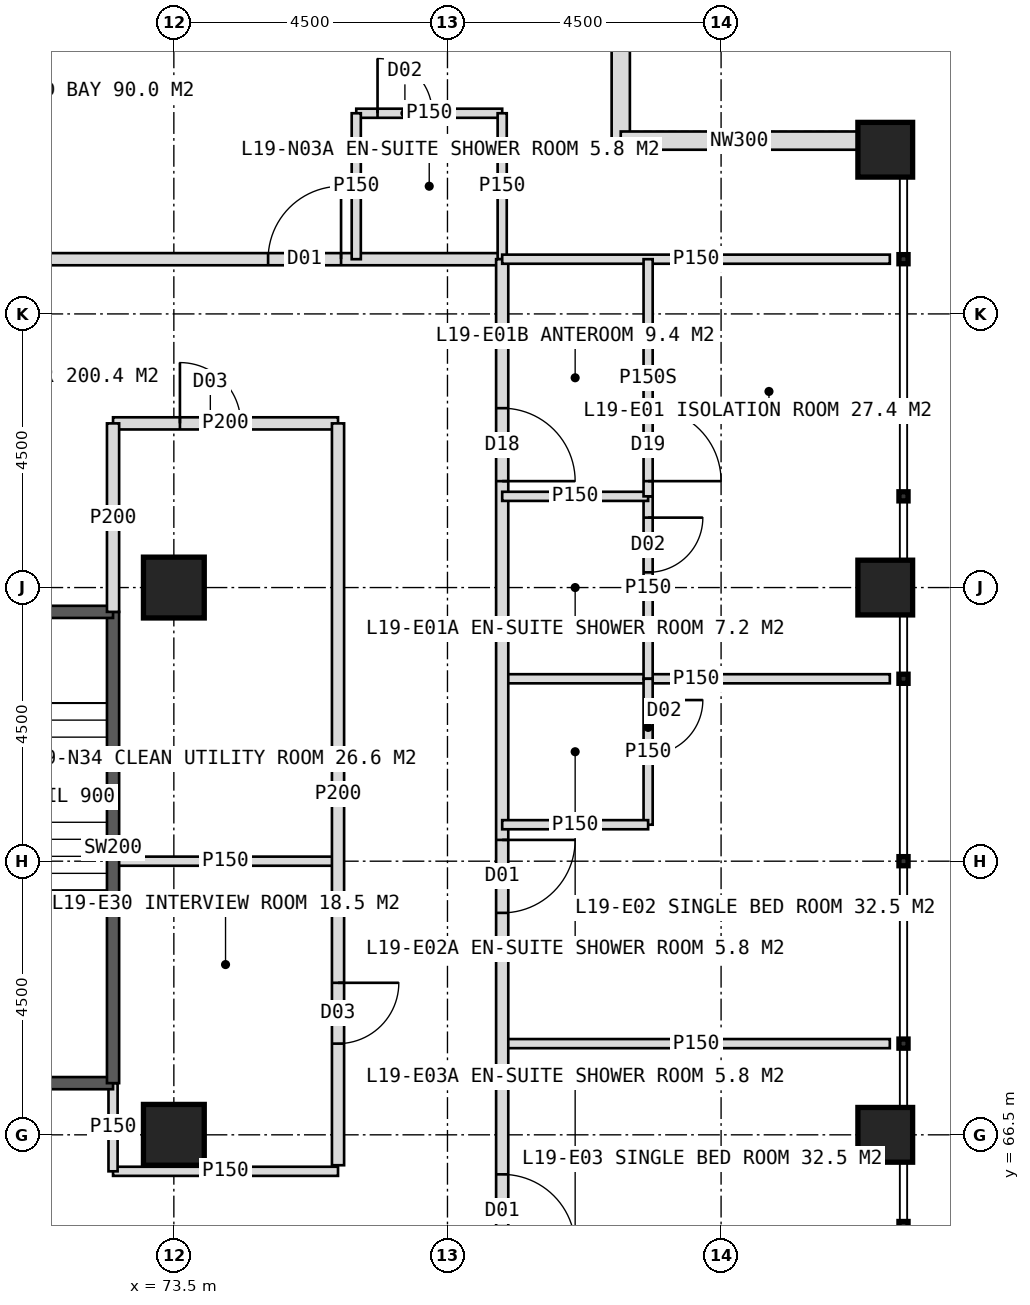
"""IFC4 building model, lengths in metres.
Left out: names, types, materials, properties, quantities, classifications, styles, units other than length and angle.
Written with IfcOpenShell. Run it as: python <this file> out.ifc"""

import sys

from ifc_helpers import new_model, si_unit, direction, frame, frame_2d, origin, origin_2d, place, context, subcontext, project, spatial, rectangle, hollow_rectangle, extrude, element, fill, save


model = new_model("IFC4")
c1 = context("Model", 3, precision=1e-05, world=origin(), true_north=direction((0.0, 1.0)))
c2 = subcontext(c1, "Body", "Model", "MODEL_VIEW")
j1 = project(units=[si_unit("LENGTHUNIT", "METRE"), si_unit("PLANEANGLEUNIT", "RADIAN")], contexts=[c1])
p1 = place(None, origin())
s1 = spatial("IfcSite", under=j1, at=p1, CompositionType="ELEMENT")
p2 = place(p1, origin())
s2 = spatial("IfcBuilding", under=s1, at=p2, CompositionType="ELEMENT")
p3 = place(p2, frame((0.0, 0.0, 83.0)))
s3 = spatial("IfcBuildingStorey", under=s2, at=p3, CompositionType="ELEMENT", Elevation=83.0)
for number, where, z_axis, x_axis in (
    (1, (73.5, 75.5, 0.0), (0.0, 0.0, 1.0), (1.0, 0.0, 0.0)),
    (2, (73.5, 66.5, 0.0), (0.0, 0.0, 1.0), (1.0, 0.0, 0.0)),
):
    element("IfcColumn", number, at=place(p3, frame(where, z_axis=z_axis, x_axis=x_axis)), inside=s3, PredefinedType="COLUMN", context=c2, shape_type="SweptSolid", body=[
        extrude(hollow_rectangle(XDim=1.0, YDim=1.0, WallThickness=0.1, at=origin_2d()), origin(), (0.0, 0.0, 1.0), 4.0),
    ])
for number, where, z_axis, x_axis in (
    (3, (85.2, 66.5, 0.0), (0.0, 0.0, 1.0), (1.0, 0.0, 0.0)),
    (4, (85.2, 75.5, 0.0), (0.0, 0.0, 1.0), (1.0, 0.0, 0.0)),
    (5, (85.2, 82.7, 0.0), (0.0, 0.0, 1.0), (1.0, 0.0, 0.0)),
):
    element("IfcColumn", number, at=place(p3, frame(where, z_axis=z_axis, x_axis=x_axis)), inside=s3, PredefinedType="COLUMN", context=c2, shape_type="SweptSolid", body=[
        extrude(hollow_rectangle(XDim=0.9, YDim=0.9, WallThickness=0.08, at=origin_2d()), origin(), (0.0, 0.0, 1.0), 4.0),
    ])
for number, where, z_axis, x_axis in (
    (6, (80.85, 86.75, 0.0), (0.0, 0.0, 1.0), (0.0, -1.0, 0.0)),
    (7, (80.85, 82.85, 0.0), (0.0, 0.0, 1.0), (1.0, 0.0, 0.0)),
):
    element("IfcWall", number, at=place(p3, frame(where, z_axis=z_axis, x_axis=x_axis)), inside=s3, PredefinedType="ELEMENTEDWALL", context=c2, shape_type="SweptSolid", body=[
        extrude(rectangle(XDim=3.9, YDim=0.3, at=frame_2d((1.95, 0.0))), origin(), (0.0, 0.0, 1.0), 2.95),
    ])
p4 = place(p3, frame((41.1, 80.9, 0.0), z_axis=(0.0, 0.0, 1.0), x_axis=(1.0, 0.0, 0.0)))
e8 = element("IfcWall", 8, at=p4, inside=s3, PredefinedType="PARTITIONING", context=c2, shape_type="SweptSolid", body=[
    extrude(rectangle(XDim=37.8, YDim=0.2, at=frame_2d((18.9, 0.0))), origin(), (0.0, 0.0, 1.0), 3.75),
])
p5 = place(p4, frame((5.85, 0.0, 0.0)))
e9 = element("IfcOpeningElement", 9, at=p5, cuts=e8, PredefinedType="OPENING", context=c2, shape_type="SweptSolid", body=[
    extrude(rectangle(XDim=1.2, YDim=2.2, at=frame_2d((0.6, 1.1))), frame((0.0, 0.11, 0.0), z_axis=(0.0, -1.0, 0.0), x_axis=(1.0, 0.0, 0.0)), (0.0, 0.0, 1.0), 0.22),
])
p6 = place(p4, frame((18.3, 0.0, 0.0)))
e10 = element("IfcOpeningElement", 10, at=p6, cuts=e8, PredefinedType="OPENING", context=c2, shape_type="SweptSolid", body=[
    extrude(rectangle(XDim=1.2, YDim=2.2, at=frame_2d((0.6, 1.1))), frame((0.0, 0.11, 0.0), z_axis=(0.0, -1.0, 0.0), x_axis=(1.0, 0.0, 0.0)), (0.0, 0.0, 1.0), 0.22),
])
p7 = place(p4, frame((33.95, 0.0, 0.0)))
e11 = element("IfcOpeningElement", 11, at=p7, cuts=e8, PredefinedType="OPENING", context=c2, shape_type="SweptSolid", body=[
    extrude(rectangle(XDim=1.2, YDim=2.2, at=frame_2d((0.6, 1.1))), frame((0.0, 0.11, 0.0), z_axis=(0.0, -1.0, 0.0), x_axis=(1.0, 0.0, 0.0)), (0.0, 0.0, 1.0), 0.22),
])
p8 = place(p3, frame((76.5, 83.3, 0.0), z_axis=(0.0, 0.0, 1.0), x_axis=(1.0, 0.0, 0.0)))
e12 = element("IfcWall", 12, at=p8, inside=s3, PredefinedType="PARTITIONING", context=c2, shape_type="SweptSolid", body=[
    extrude(rectangle(XDim=2.4, YDim=0.15, at=frame_2d((1.2, 0.0))), origin(), (0.0, 0.0, 1.0), 3.75),
])
p9 = place(p8, frame((0.35, 0.0, 0.0)))
e13 = element("IfcOpeningElement", 13, at=p9, cuts=e12, PredefinedType="OPENING", context=c2, shape_type="SweptSolid", body=[
    extrude(rectangle(XDim=0.9, YDim=2.1, at=frame_2d((0.45, 1.05))), frame((0.0, 0.085, 0.0), z_axis=(0.0, -1.0, 0.0), x_axis=(1.0, 0.0, 0.0)), (0.0, 0.0, 1.0), 0.17),
])
for number, where, z_axis, x_axis in (
    (14, (76.5, 80.9, 0.0), (0.0, 0.0, 1.0), (0.0, 1.0, 0.0)),
    (15, (78.9, 80.9, 0.0), (0.0, 0.0, 1.0), (0.0, 1.0, 0.0)),
):
    element("IfcWall", number, at=place(p3, frame(where, z_axis=z_axis, x_axis=x_axis)), inside=s3, PredefinedType="PARTITIONING", context=c2, shape_type="SweptSolid", body=[
        extrude(rectangle(XDim=2.4, YDim=0.15, at=frame_2d((1.2, 0.0))), origin(), (0.0, 0.0, 1.0), 3.75),
    ])
p10 = place(p3, frame((72.5, 78.2, 0.0), z_axis=(0.0, 0.0, 1.0), x_axis=(1.0, 0.0, 0.0)))
e16 = element("IfcWall", 16, at=p10, inside=s3, PredefinedType="PARTITIONING", context=c2, shape_type="SweptSolid", body=[
    extrude(rectangle(XDim=3.7, YDim=0.2, at=frame_2d((1.85, 0.0))), origin(), (0.0, 0.0, 1.0), 3.75),
])
p11 = place(p10, frame((1.1, 0.0, 0.0)))
e17 = element("IfcOpeningElement", 17, at=p11, cuts=e16, PredefinedType="OPENING", context=c2, shape_type="SweptSolid", body=[
    extrude(rectangle(XDim=1.0, YDim=2.1, at=frame_2d((0.5, 1.05))), frame((0.0, 0.11, 0.0), z_axis=(0.0, -1.0, 0.0), x_axis=(1.0, 0.0, 0.0)), (0.0, 0.0, 1.0), 0.22),
])
for number, where, z_axis, x_axis in (
    (18, (78.9, 74.0, 0.0), (0.0, 0.0, 1.0), (1.0, 0.0, 0.0)),
    (19, (78.9, 68.0, 0.0), (0.0, 0.0, 1.0), (1.0, 0.0, 0.0)),
):
    element("IfcWall", number, at=place(p3, frame(where, z_axis=z_axis, x_axis=x_axis)), inside=s3, PredefinedType="PARTITIONING", context=c2, shape_type="SweptSolid", body=[
        extrude(rectangle(XDim=6.375, YDim=0.15, at=frame_2d((3.188, 0.0))), origin(), (0.0, 0.0, 1.0), 3.75),
    ])
p12 = place(p3, frame((78.9, 80.9, 0.0), z_axis=(0.0, 0.0, 1.0), x_axis=(0.0, -1.0, 0.0)))
e20 = element("IfcWall", 20, at=p12, inside=s3, PredefinedType="PARTITIONING", context=c2, shape_type="SweptSolid", body=[
    extrude(rectangle(XDim=37.8, YDim=0.2, at=frame_2d((18.9, 0.0))), origin(), (0.0, 0.0, 1.0), 3.75),
])
p13 = place(p12, frame((2.45, 0.0, 0.0)))
e21 = element("IfcOpeningElement", 21, at=p13, cuts=e20, PredefinedType="OPENING", context=c2, shape_type="SweptSolid", body=[
    extrude(rectangle(XDim=1.2, YDim=2.2, at=frame_2d((0.6, 1.1))), frame((0.0, 0.11, 0.0), z_axis=(0.0, -1.0, 0.0), x_axis=(1.0, 0.0, 0.0)), (0.0, 0.0, 1.0), 0.22),
])
p14 = place(p12, frame((9.55, 0.0, 0.0)))
e22 = element("IfcOpeningElement", 22, at=p14, cuts=e20, PredefinedType="OPENING", context=c2, shape_type="SweptSolid", body=[
    extrude(rectangle(XDim=1.2, YDim=2.2, at=frame_2d((0.6, 1.1))), frame((0.0, 0.11, 0.0), z_axis=(0.0, -1.0, 0.0), x_axis=(1.0, 0.0, 0.0)), (0.0, 0.0, 1.0), 0.22),
])
p15 = place(p12, frame((15.05, 0.0, 0.0)))
e23 = element("IfcOpeningElement", 23, at=p15, cuts=e20, PredefinedType="OPENING", context=c2, shape_type="SweptSolid", body=[
    extrude(rectangle(XDim=1.2, YDim=2.2, at=frame_2d((0.6, 1.1))), frame((0.0, 0.11, 0.0), z_axis=(0.0, -1.0, 0.0), x_axis=(1.0, 0.0, 0.0)), (0.0, 0.0, 1.0), 0.22),
])
p16 = place(p12, frame((21.55, 0.0, 0.0)))
e24 = element("IfcOpeningElement", 24, at=p16, cuts=e20, PredefinedType="OPENING", context=c2, shape_type="SweptSolid", body=[
    extrude(rectangle(XDim=1.2, YDim=2.2, at=frame_2d((0.6, 1.1))), frame((0.0, 0.11, 0.0), z_axis=(0.0, -1.0, 0.0), x_axis=(1.0, 0.0, 0.0)), (0.0, 0.0, 1.0), 0.22),
])
p17 = place(p12, frame((33.95, 0.0, 0.0)))
e25 = element("IfcOpeningElement", 25, at=p17, cuts=e20, PredefinedType="OPENING", context=c2, shape_type="SweptSolid", body=[
    extrude(rectangle(XDim=1.2, YDim=2.2, at=frame_2d((0.6, 1.1))), frame((0.0, 0.11, 0.0), z_axis=(0.0, -1.0, 0.0), x_axis=(1.0, 0.0, 0.0)), (0.0, 0.0, 1.0), 0.22),
])
p18 = place(p3, frame((78.9, 80.9, 0.0), z_axis=(0.0, 0.0, 1.0), x_axis=(1.0, 0.0, 0.0)))
e26 = element("IfcWall", 26, at=p18, inside=s3, PredefinedType="PARTITIONING", context=c2, shape_type="SweptSolid", body=[
    extrude(rectangle(XDim=6.375, YDim=0.15, at=frame_2d((3.188, 0.0))), origin(), (0.0, 0.0, 1.0), 3.75),
])
p19 = place(p3, frame((81.3, 77.0, 0.0), z_axis=(0.0, 0.0, 1.0), x_axis=(0.0, -1.0, 0.0)))
e27 = element("IfcWall", 27, at=p19, inside=s3, PredefinedType="PARTITIONING", context=c2, shape_type="SweptSolid", body=[
    extrude(rectangle(XDim=3.0, YDim=0.15, at=frame_2d((1.5, 0.0))), origin(), (0.0, 0.0, 1.0), 3.75),
])
p20 = place(p19, frame((0.35, 0.0, 0.0)))
e28 = element("IfcOpeningElement", 28, at=p20, cuts=e27, PredefinedType="OPENING", context=c2, shape_type="SweptSolid", body=[
    extrude(rectangle(XDim=0.9, YDim=2.1, at=frame_2d((0.45, 1.05))), frame((0.0, 0.085, 0.0), z_axis=(0.0, -1.0, 0.0), x_axis=(1.0, 0.0, 0.0)), (0.0, 0.0, 1.0), 0.17),
])
p21 = place(p3, frame((78.9, 77.0, 0.0), z_axis=(0.0, 0.0, 1.0), x_axis=(1.0, 0.0, 0.0)))
e29 = element("IfcWall", 29, at=p21, inside=s3, PredefinedType="PARTITIONING", context=c2, shape_type="SweptSolid", body=[
    extrude(rectangle(XDim=2.4, YDim=0.15, at=frame_2d((1.2, 0.0))), origin(), (0.0, 0.0, 1.0), 3.75),
])
p22 = place(p3, frame((81.3, 80.9, 0.0), z_axis=(0.0, 0.0, 1.0), x_axis=(0.0, -1.0, 0.0)))
e30 = element("IfcWall", 30, at=p22, inside=s3, PredefinedType="PARTITIONING", context=c2, shape_type="SweptSolid", body=[
    extrude(rectangle(XDim=3.9, YDim=0.15, at=frame_2d((1.95, 0.0))), origin(), (0.0, 0.0, 1.0), 3.75),
])
p23 = place(p22, frame((2.45, 0.0, 0.0)))
e31 = element("IfcOpeningElement", 31, at=p23, cuts=e30, PredefinedType="OPENING", context=c2, shape_type="SweptSolid", body=[
    extrude(rectangle(XDim=1.2, YDim=2.2, at=frame_2d((0.6, 1.1))), frame((0.0, 0.085, 0.0), z_axis=(0.0, -1.0, 0.0), x_axis=(1.0, 0.0, 0.0)), (0.0, 0.0, 1.0), 0.17),
])
p24 = place(p3, frame((81.3, 74.0, 0.0), z_axis=(0.0, 0.0, 1.0), x_axis=(0.0, -1.0, 0.0)))
e32 = element("IfcWall", 32, at=p24, inside=s3, PredefinedType="PARTITIONING", context=c2, shape_type="SweptSolid", body=[
    extrude(rectangle(XDim=2.4, YDim=0.15, at=frame_2d((1.2, 0.0))), origin(), (0.0, 0.0, 1.0), 3.75),
])
p25 = place(p24, frame((0.35, 0.0, 0.0)))
e33 = element("IfcOpeningElement", 33, at=p25, cuts=e32, PredefinedType="OPENING", context=c2, shape_type="SweptSolid", body=[
    extrude(rectangle(XDim=0.9, YDim=2.1, at=frame_2d((0.45, 1.05))), frame((0.0, 0.085, 0.0), z_axis=(0.0, -1.0, 0.0), x_axis=(1.0, 0.0, 0.0)), (0.0, 0.0, 1.0), 0.17),
])
p26 = place(p3, frame((78.9, 71.6, 0.0), z_axis=(0.0, 0.0, 1.0), x_axis=(1.0, 0.0, 0.0)))
e34 = element("IfcWall", 34, at=p26, inside=s3, PredefinedType="PARTITIONING", context=c2, shape_type="SweptSolid", body=[
    extrude(rectangle(XDim=2.4, YDim=0.15, at=frame_2d((1.2, 0.0))), origin(), (0.0, 0.0, 1.0), 3.75),
])
p27 = place(p3, frame((72.5, 71.0, 0.0), z_axis=(0.0, 0.0, 1.0), x_axis=(1.0, 0.0, 0.0)))
e35 = element("IfcWall", 35, at=p27, inside=s3, PredefinedType="PARTITIONING", context=c2, shape_type="SweptSolid", body=[
    extrude(rectangle(XDim=3.7, YDim=0.15, at=frame_2d((1.85, 0.0))), origin(), (0.0, 0.0, 1.0), 3.75),
])
p28 = place(p3, frame((76.2, 78.2, 0.0), z_axis=(0.0, 0.0, 1.0), x_axis=(0.0, -1.0, 0.0)))
e36 = element("IfcWall", 36, at=p28, inside=s3, PredefinedType="PARTITIONING", context=c2, shape_type="SweptSolid", body=[
    extrude(rectangle(XDim=12.2, YDim=0.2, at=frame_2d((6.1, 0.0))), origin(), (0.0, 0.0, 1.0), 3.75),
])
p29 = place(p28, frame((9.2, 0.0, 0.0)))
e37 = element("IfcOpeningElement", 37, at=p29, cuts=e36, PredefinedType="OPENING", context=c2, shape_type="SweptSolid", body=[
    extrude(rectangle(XDim=1.0, YDim=2.1, at=frame_2d((0.5, 1.05))), frame((0.0, 0.11, 0.0), z_axis=(0.0, -1.0, 0.0), x_axis=(1.0, 0.0, 0.0)), (0.0, 0.0, 1.0), 0.22),
])
p30 = place(p3, frame((72.5, 65.9, 0.0), z_axis=(0.0, 0.0, 1.0), x_axis=(1.0, 0.0, 0.0)))
e38 = element("IfcWall", 38, at=p30, inside=s3, PredefinedType="PARTITIONING", context=c2, shape_type="SweptSolid", body=[
    extrude(rectangle(XDim=3.7, YDim=0.15, at=frame_2d((1.85, 0.0))), origin(), (0.0, 0.0, 1.0), 3.75),
])
p31 = place(p3, frame((72.5, 65.9, 0.0), z_axis=(0.0, 0.0, 1.0), x_axis=(0.0, 1.0, 0.0)))
e39 = element("IfcWall", 39, at=p31, inside=s3, PredefinedType="PARTITIONING", context=c2, shape_type="SweptSolid", body=[
    extrude(rectangle(XDim=1.45, YDim=0.15, at=frame_2d((0.725, 0.0))), origin(), (0.0, 0.0, 1.0), 3.75),
])
p32 = place(p3, frame((69.0, 67.35, 0.0), z_axis=(0.0, 0.0, 1.0), x_axis=(1.0, 0.0, 0.0)))
e40 = element("IfcWall", 40, at=p32, inside=s3, PredefinedType="SOLIDWALL", context=c2, shape_type="SweptSolid", body=[
    extrude(rectangle(XDim=3.5, YDim=0.2, at=frame_2d((1.75, 0.0))), origin(), (0.0, 0.0, 1.0), 3.75),
])
p33 = place(p3, frame((72.5, 67.35, 0.0), z_axis=(0.0, 0.0, 1.0), x_axis=(0.0, 1.0, 0.0)))
e41 = element("IfcWall", 41, at=p33, inside=s3, PredefinedType="SOLIDWALL", context=c2, shape_type="SweptSolid", body=[
    extrude(rectangle(XDim=7.75, YDim=0.2, at=frame_2d((3.875, 0.0))), origin(), (0.0, 0.0, 1.0), 3.75),
])
p34 = place(p3, frame((69.0, 75.1, 0.0), z_axis=(0.0, 0.0, 1.0), x_axis=(1.0, 0.0, 0.0)))
e42 = element("IfcWall", 42, at=p34, inside=s3, PredefinedType="SOLIDWALL", context=c2, shape_type="SweptSolid", body=[
    extrude(rectangle(XDim=3.5, YDim=0.2, at=frame_2d((1.75, 0.0))), origin(), (0.0, 0.0, 1.0), 3.75),
])
p35 = place(p34, frame((1.15, 0.0, 0.0)))
e43 = element("IfcOpeningElement", 43, at=p35, cuts=e42, PredefinedType="OPENING", context=c2, shape_type="SweptSolid", body=[
    extrude(rectangle(XDim=1.2, YDim=2.1, at=frame_2d((0.6, 1.05))), frame((0.0, 0.11, 0.0), z_axis=(0.0, -1.0, 0.0), x_axis=(1.0, 0.0, 0.0)), (0.0, 0.0, 1.0), 0.22),
])
p36 = place(p3, frame((72.5, 75.1, 0.0), z_axis=(0.0, 0.0, 1.0), x_axis=(0.0, 1.0, 0.0)))
e44 = element("IfcWall", 44, at=p36, inside=s3, PredefinedType="PARTITIONING", context=c2, shape_type="SweptSolid", body=[
    extrude(rectangle(XDim=3.1, YDim=0.2, at=frame_2d((1.55, 0.0))), origin(), (0.0, 0.0, 1.0), 3.75),
])
p37 = place(p7, origin())
e45 = element("IfcDoor", 45, at=p37, inside=s3, OperationType="SINGLE_SWING_RIGHT", PredefinedType="DOOR", context=c2, shape_type="SweptSolid", body=[
    extrude(rectangle(XDim=1.2, YDim=2.2, at=frame_2d((0.6, 1.1))), frame((0.0, 0.025, 0.0), z_axis=(0.0, -1.0, 0.0), x_axis=(1.0, 0.0, 0.0)), (0.0, 0.0, 1.0), 0.05),
])
fill(e11, e45)
p38 = place(p9, origin())
e46 = element("IfcDoor", 46, at=p38, inside=s3, OperationType="SINGLE_SWING_LEFT", PredefinedType="DOOR", context=c2, shape_type="SweptSolid", body=[
    extrude(rectangle(XDim=0.9, YDim=2.1, at=frame_2d((0.45, 1.05))), frame((0.0, 0.025, 0.0), z_axis=(0.0, -1.0, 0.0), x_axis=(1.0, 0.0, 0.0)), (0.0, 0.0, 1.0), 0.05),
])
fill(e13, e46)
p39 = place(p11, origin())
e47 = element("IfcDoor", 47, at=p39, inside=s3, OperationType="SINGLE_SWING_LEFT", PredefinedType="DOOR", context=c2, shape_type="SweptSolid", body=[
    extrude(rectangle(XDim=1.0, YDim=2.1, at=frame_2d((0.5, 1.05))), frame((0.0, 0.025, 0.0), z_axis=(0.0, -1.0, 0.0), x_axis=(1.0, 0.0, 0.0)), (0.0, 0.0, 1.0), 0.05),
])
fill(e17, e47)
p40 = place(p23, origin())
e48 = element("IfcDoor", 48, at=p40, inside=s3, OperationType="SINGLE_SWING_RIGHT", PredefinedType="DOOR", context=c2, shape_type="SweptSolid", body=[
    extrude(rectangle(XDim=1.2, YDim=2.2, at=frame_2d((0.6, 1.1))), frame((0.0, 0.025, 0.0), z_axis=(0.0, -1.0, 0.0), x_axis=(1.0, 0.0, 0.0)), (0.0, 0.0, 1.0), 0.05),
])
fill(e31, e48)
p41 = place(p13, origin())
e49 = element("IfcDoor", 49, at=p41, inside=s3, OperationType="SINGLE_SWING_RIGHT", PredefinedType="DOOR", context=c2, shape_type="SweptSolid", body=[
    extrude(rectangle(XDim=1.2, YDim=2.2, at=frame_2d((0.6, 1.1))), frame((0.0, 0.025, 0.0), z_axis=(0.0, -1.0, 0.0), x_axis=(1.0, 0.0, 0.0)), (0.0, 0.0, 1.0), 0.05),
])
fill(e21, e49)
p42 = place(p20, origin())
e50 = element("IfcDoor", 50, at=p42, inside=s3, OperationType="SINGLE_SWING_LEFT", PredefinedType="DOOR", context=c2, shape_type="SweptSolid", body=[
    extrude(rectangle(XDim=0.9, YDim=2.1, at=frame_2d((0.45, 1.05))), frame((0.0, 0.025, 0.0), z_axis=(0.0, -1.0, 0.0), x_axis=(1.0, 0.0, 0.0)), (0.0, 0.0, 1.0), 0.05),
])
fill(e28, e50)
p43 = place(p14, origin())
e51 = element("IfcDoor", 51, at=p43, inside=s3, OperationType="SINGLE_SWING_LEFT", PredefinedType="DOOR", context=c2, shape_type="SweptSolid", body=[
    extrude(rectangle(XDim=1.2, YDim=2.2, at=frame_2d((0.6, 1.1))), frame((0.0, 0.025, 0.0), z_axis=(0.0, -1.0, 0.0), x_axis=(1.0, 0.0, 0.0)), (0.0, 0.0, 1.0), 0.05),
])
fill(e22, e51)
p44 = place(p25, origin())
e52 = element("IfcDoor", 52, at=p44, inside=s3, OperationType="SINGLE_SWING_LEFT", PredefinedType="DOOR", context=c2, shape_type="SweptSolid", body=[
    extrude(rectangle(XDim=0.9, YDim=2.1, at=frame_2d((0.45, 1.05))), frame((0.0, 0.025, 0.0), z_axis=(0.0, -1.0, 0.0), x_axis=(1.0, 0.0, 0.0)), (0.0, 0.0, 1.0), 0.05),
])
fill(e33, e52)
p45 = place(p15, origin())
e53 = element("IfcDoor", 53, at=p45, inside=s3, OperationType="SINGLE_SWING_RIGHT", PredefinedType="DOOR", context=c2, shape_type="SweptSolid", body=[
    extrude(rectangle(XDim=1.2, YDim=2.2, at=frame_2d((0.6, 1.1))), frame((0.0, 0.025, 0.0), z_axis=(0.0, -1.0, 0.0), x_axis=(1.0, 0.0, 0.0)), (0.0, 0.0, 1.0), 0.05),
])
fill(e23, e53)
p46 = place(p29, origin())
e54 = element("IfcDoor", 54, at=p46, inside=s3, OperationType="SINGLE_SWING_LEFT", PredefinedType="DOOR", context=c2, shape_type="SweptSolid", body=[
    extrude(rectangle(XDim=1.0, YDim=2.1, at=frame_2d((0.5, 1.05))), frame((0.0, 0.025, 0.0), z_axis=(0.0, -1.0, 0.0), x_axis=(1.0, 0.0, 0.0)), (0.0, 0.0, 1.0), 0.05),
])
fill(e37, e54)
save(model, sys.argv[1])
